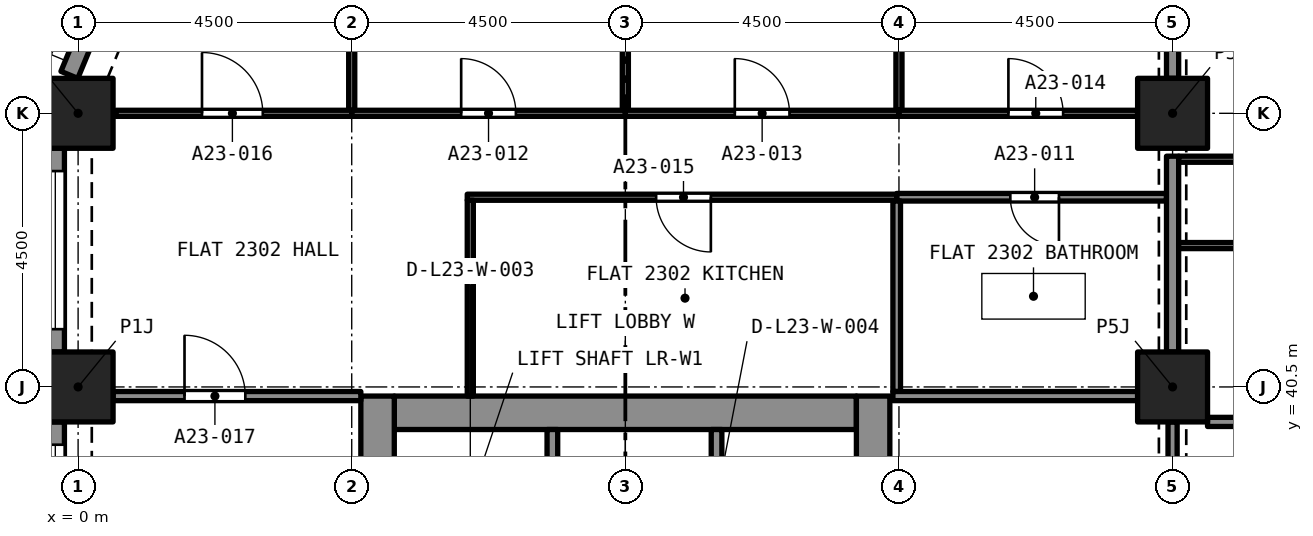
"""IFC4 building model, lengths in metres.
Left out: names, types, materials, properties, quantities, classifications, styles, units other than length and angle.
Written with IfcOpenShell. Run it as: python <this file> out.ifc"""

import sys

from ifc_helpers import new_model, si_unit, direction, frame, frame_2d, origin, origin_2d, place, context, subcontext, project, spatial, rectangle, extrude, element, fill, save


model = new_model("IFC4")
c1 = context("Model", 3, precision=1e-05, world=origin(), true_north=direction((0.0, 1.0)))
c2 = subcontext(c1, "Body", "Model", "MODEL_VIEW")
j1 = project(units=[si_unit("LENGTHUNIT", "METRE"), si_unit("PLANEANGLEUNIT", "RADIAN")], contexts=[c1])
p1 = place(None, origin())
s1 = spatial("IfcSite", under=j1, at=p1, CompositionType="ELEMENT")
p2 = place(p1, origin())
s2 = spatial("IfcBuilding", under=s1, at=p2, CompositionType="ELEMENT")
p3 = place(p2, frame((0.0, 0.0, 86.4)))
s3 = spatial("IfcBuildingStorey", under=s2, at=p3, CompositionType="ELEMENT", Elevation=86.4)
for number, where, z_axis, x_axis in (
    (1, (0.0, 40.5, 0.0), (0.0, 0.0, 1.0), (1.0, 0.0, 0.0)),
    (2, (18.0, 40.5, 0.0), (0.0, 0.0, 1.0), (1.0, 0.0, 0.0)),
    (3, (0.0, 45.0, 0.0), (0.0, 0.0, 1.0), (1.0, 0.0, 0.0)),
    (4, (18.0, 45.0, 0.0), (0.0, 0.0, 1.0), (1.0, 0.0, 0.0)),
):
    element("IfcColumn", number, at=place(p3, frame(where, z_axis=z_axis, x_axis=x_axis)), inside=s3, PredefinedType="COLUMN", context=c2, shape_type="SweptSolid", body=[
        extrude(rectangle(XDim=1.15, YDim=1.15, at=origin_2d()), origin(), (0.0, 0.0, 1.0), 3.2),
    ])
p4 = place(p3, frame((5.2, 40.075, 0.0), z_axis=(0.0, 0.0, 1.0), x_axis=(1.0, 0.0, 0.0)))
e5 = element("IfcWall", 5, at=p4, inside=s3, PredefinedType="SOLIDWALL", context=c2, shape_type="SweptSolid", body=[
    extrude(rectangle(XDim=7.6, YDim=0.55, at=frame_2d((3.8, 0.0))), origin(), (0.0, 0.0, 1.0), 3.2),
])
p5 = place(p3, frame((4.925, 27.15, 0.0), z_axis=(0.0, 0.0, 1.0), x_axis=(0.0, 1.0, 0.0)))
e6 = element("IfcWall", 6, at=p5, inside=s3, PredefinedType="SOLIDWALL", context=c2, shape_type="SweptSolid", body=[
    extrude(rectangle(XDim=13.2, YDim=0.55, at=frame_2d((6.6, 0.0))), origin(), (0.0, 0.0, 1.0), 3.2),
])
p6 = place(p5, frame((8.8, 0.0, 0.0)))
e7 = element("IfcOpeningElement", 7, at=p6, cuts=e6, PredefinedType="OPENING", context=c2, shape_type="SweptSolid", body=[
    extrude(rectangle(XDim=1.2, YDim=2.1, at=frame_2d((0.6, 1.05))), frame((0.0, 0.285, 0.0), z_axis=(0.0, -1.0, 0.0), x_axis=(1.0, 0.0, 0.0)), (0.0, 0.0, 1.0), 0.57),
])
p7 = place(p3, frame((13.075, 27.15, 0.0), z_axis=(0.0, 0.0, 1.0), x_axis=(0.0, 1.0, 0.0)))
e8 = element("IfcWall", 8, at=p7, inside=s3, PredefinedType="SOLIDWALL", context=c2, shape_type="SweptSolid", body=[
    extrude(rectangle(XDim=13.2, YDim=0.55, at=frame_2d((6.6, 0.0))), origin(), (0.0, 0.0, 1.0), 3.2),
])
p8 = place(p7, frame((10.95, 0.0, 0.0)))
e9 = element("IfcOpeningElement", 9, at=p8, cuts=e8, PredefinedType="OPENING", context=c2, shape_type="SweptSolid", body=[
    extrude(rectangle(XDim=1.1, YDim=2.1, at=frame_2d((0.55, 1.05))), frame((0.0, 0.285, 0.0), z_axis=(0.0, -1.0, 0.0), x_axis=(1.0, 0.0, 0.0)), (0.0, 0.0, 1.0), 0.57),
])
p9 = place(p7, frame((8.8, 0.0, 0.0)))
e10 = element("IfcOpeningElement", 10, at=p9, cuts=e8, PredefinedType="OPENING", context=c2, shape_type="SweptSolid", body=[
    extrude(rectangle(XDim=1.2, YDim=2.1, at=frame_2d((0.6, 1.05))), frame((0.0, 0.285, 0.0), z_axis=(0.0, -1.0, 0.0), x_axis=(1.0, 0.0, 0.0)), (0.0, 0.0, 1.0), 0.57),
])
p10 = place(p3, frame((-0.144, 45.632, 0.0), z_axis=(0.0, 0.0, 1.0), x_axis=(0.382723818695, 0.923862802911, 0.0)))
e11 = element("IfcWall", 11, at=p10, inside=s3, PredefinedType="SOLIDWALL", context=c2, shape_type="SweptSolid", body=[
    extrude(rectangle(XDim=2.164, YDim=0.3, at=frame_2d((1.082, 0.0))), origin(), (0.0, 0.0, 1.0), 3.2),
])
p11 = place(p10, frame((0.493, 0.0, 0.45)))
e12 = element("IfcOpeningElement", 12, at=p11, cuts=e11, PredefinedType="OPENING", context=c2, shape_type="SweptSolid", body=[
    extrude(rectangle(XDim=1.4, YDim=1.95, at=frame_2d((0.7, 0.975))), frame((0.0, 0.16, 0.0), z_axis=(0.0, -1.0, 0.0), x_axis=(1.0, 0.0, 0.0)), (0.0, 0.0, 1.0), 0.32),
])
p12 = place(p3, frame((-0.375, 41.075, 0.0), z_axis=(0.0, 0.0, 1.0), x_axis=(0.0, 1.0, 0.0)))
e13 = element("IfcWall", 13, at=p12, inside=s3, PredefinedType="SOLIDWALL", context=c2, shape_type="SweptSolid", body=[
    extrude(rectangle(XDim=3.35, YDim=0.3, at=frame_2d((1.675, 0.0))), origin(), (0.0, 0.0, 1.0), 3.2),
])
p13 = place(p12, frame((0.375, 0.0, 0.45)))
e14 = element("IfcOpeningElement", 14, at=p13, cuts=e13, PredefinedType="OPENING", context=c2, shape_type="SweptSolid", body=[
    extrude(rectangle(XDim=2.6, YDim=1.95, at=frame_2d((1.3, 0.975))), frame((0.0, 0.16, 0.0), z_axis=(0.0, -1.0, 0.0), x_axis=(1.0, 0.0, 0.0)), (0.0, 0.0, 1.0), 0.32),
])
p14 = place(p3, frame((-0.375, 36.575, 0.0), z_axis=(0.0, 0.0, 1.0), x_axis=(0.0, 1.0, 0.0)))
e15 = element("IfcWall", 15, at=p14, inside=s3, PredefinedType="SOLIDWALL", context=c2, shape_type="SweptSolid", body=[
    extrude(rectangle(XDim=3.35, YDim=0.3, at=frame_2d((1.675, 0.0))), origin(), (0.0, 0.0, 1.0), 3.2),
])
p15 = place(p14, frame((0.375, 0.0, 0.45)))
e16 = element("IfcOpeningElement", 16, at=p15, cuts=e15, PredefinedType="OPENING", context=c2, shape_type="SweptSolid", body=[
    extrude(rectangle(XDim=2.6, YDim=1.95, at=frame_2d((1.3, 0.975))), frame((0.0, 0.16, 0.0), z_axis=(0.0, -1.0, 0.0), x_axis=(1.0, 0.0, 0.0)), (0.0, 0.0, 1.0), 0.32),
])
p16 = place(p3, frame((17.9, 43.62, 0.0), z_axis=(0.0, 0.0, 1.0), x_axis=(-1.0, 0.0, 0.0)))
e17 = element("IfcWall", 17, at=p16, inside=s3, PredefinedType="PARTITIONING", context=c2, shape_type="SweptSolid", body=[
    extrude(rectangle(XDim=4.437, YDim=0.125, at=frame_2d((2.219, 0.0))), origin(), (0.0, 0.0, 1.0), 2.9),
])
p17 = place(p16, frame((1.769, 0.0, 0.0)))
e18 = element("IfcOpeningElement", 18, at=p17, cuts=e17, PredefinedType="OPENING", context=c2, shape_type="SweptSolid", body=[
    extrude(rectangle(XDim=0.8, YDim=2.1, at=frame_2d((0.4, 1.05))), frame((0.0, 0.073, 0.0), z_axis=(0.0, -1.0, 0.0), x_axis=(1.0, 0.0, 0.0)), (0.0, 0.0, 1.0), 0.145),
])
p18 = place(p3, frame((13.463, 40.425, 0.0), z_axis=(0.0, 0.0, 1.0), x_axis=(0.0, 1.0, 0.0)))
e19 = element("IfcWall", 19, at=p18, inside=s3, PredefinedType="PARTITIONING", context=c2, shape_type="SweptSolid", body=[
    extrude(rectangle(XDim=3.133, YDim=0.125, at=frame_2d((1.566, 0.0))), origin(), (0.0, 0.0, 1.0), 2.9),
])
p19 = place(p3, frame((18.0, 41.075, 0.0), z_axis=(0.0, 0.0, 1.0), x_axis=(0.0, 1.0, 0.0)))
e20 = element("IfcWall", 20, at=p19, inside=s3, PredefinedType="PARTITIONING", context=c2, shape_type="SweptSolid", body=[
    extrude(rectangle(XDim=3.22, YDim=0.2, at=frame_2d((1.61, 0.0))), origin(), (0.0, 0.0, 1.0), 2.38),
])
p20 = place(p3, frame((13.4, 40.35, 0.0), z_axis=(0.0, 0.0, 1.0), x_axis=(1.0, 0.0, 0.0)))
e21 = element("IfcWall", 21, at=p20, inside=s3, PredefinedType="PARTITIONING", context=c2, shape_type="SweptSolid", body=[
    extrude(rectangle(XDim=4.025, YDim=0.15, at=frame_2d((2.012, 0.0))), origin(), (0.0, 0.0, 1.0), 2.9),
])
p21 = place(p3, frame((9.0, 45.05, 0.0), z_axis=(0.0, 0.0, 1.0), x_axis=(0.0, 1.0, 0.0)))
e22 = element("IfcWall", 22, at=p21, inside=s3, PredefinedType="PARTITIONING", context=c2, shape_type="SweptSolid", body=[
    extrude(rectangle(XDim=3.875, YDim=0.1, at=frame_2d((1.938, 0.0))), origin(), (0.0, 0.0, 1.0), 2.9),
])
p22 = place(p3, frame((4.5, 45.0, 0.0), z_axis=(0.0, 0.0, 1.0), x_axis=(1.0, 0.0, 0.0)))
e23 = element("IfcWall", 23, at=p22, inside=s3, PredefinedType="PARTITIONING", context=c2, shape_type="SweptSolid", body=[
    extrude(rectangle(XDim=4.5, YDim=0.1, at=frame_2d((2.25, 0.0))), origin(), (0.0, 0.0, 1.0), 2.9),
])
p23 = place(p22, frame((1.8, 0.0, 0.0)))
e24 = element("IfcOpeningElement", 24, at=p23, cuts=e23, PredefinedType="OPENING", context=c2, shape_type="SweptSolid", body=[
    extrude(rectangle(XDim=0.9, YDim=2.1, at=frame_2d((0.45, 1.05))), frame((0.0, 0.06, 0.0), z_axis=(0.0, -1.0, 0.0), x_axis=(1.0, 0.0, 0.0)), (0.0, 0.0, 1.0), 0.12),
])
p24 = place(p3, frame((4.5, 45.05, 0.0), z_axis=(0.0, 0.0, 1.0), x_axis=(0.0, 1.0, 0.0)))
e25 = element("IfcWall", 25, at=p24, inside=s3, PredefinedType="PARTITIONING", context=c2, shape_type="SweptSolid", body=[
    extrude(rectangle(XDim=3.828, YDim=0.1, at=frame_2d((1.914, 0.0))), origin(), (0.0, 0.0, 1.0), 2.9),
])
p25 = place(p3, frame((13.5, 45.05, 0.0), z_axis=(0.0, 0.0, 1.0), x_axis=(0.0, 1.0, 0.0)))
e26 = element("IfcWall", 26, at=p25, inside=s3, PredefinedType="PARTITIONING", context=c2, shape_type="SweptSolid", body=[
    extrude(rectangle(XDim=3.875, YDim=0.1, at=frame_2d((1.938, 0.0))), origin(), (0.0, 0.0, 1.0), 2.9),
])
p26 = place(p3, frame((9.0, 45.0, 0.0), z_axis=(0.0, 0.0, 1.0), x_axis=(1.0, 0.0, 0.0)))
e27 = element("IfcWall", 27, at=p26, inside=s3, PredefinedType="PARTITIONING", context=c2, shape_type="SweptSolid", body=[
    extrude(rectangle(XDim=4.5, YDim=0.1, at=frame_2d((2.25, 0.0))), origin(), (0.0, 0.0, 1.0), 2.9),
])
p27 = place(p26, frame((1.8, 0.0, 0.0)))
e28 = element("IfcOpeningElement", 28, at=p27, cuts=e27, PredefinedType="OPENING", context=c2, shape_type="SweptSolid", body=[
    extrude(rectangle(XDim=0.9, YDim=2.1, at=frame_2d((0.45, 1.05))), frame((0.0, 0.06, 0.0), z_axis=(0.0, -1.0, 0.0), x_axis=(1.0, 0.0, 0.0)), (0.0, 0.0, 1.0), 0.12),
])
p28 = place(p3, frame((13.5, 45.0, 0.0), z_axis=(0.0, 0.0, 1.0), x_axis=(1.0, 0.0, 0.0)))
e29 = element("IfcWall", 29, at=p28, inside=s3, PredefinedType="PARTITIONING", context=c2, shape_type="SweptSolid", body=[
    extrude(rectangle(XDim=3.925, YDim=0.1, at=frame_2d((1.962, 0.0))), origin(), (0.0, 0.0, 1.0), 2.9),
])
p29 = place(p28, frame((1.8, 0.0, 0.0)))
e30 = element("IfcOpeningElement", 30, at=p29, cuts=e29, PredefinedType="OPENING", context=c2, shape_type="SweptSolid", body=[
    extrude(rectangle(XDim=0.9, YDim=2.1, at=frame_2d((0.45, 1.05))), frame((0.0, 0.06, 0.0), z_axis=(0.0, -1.0, 0.0), x_axis=(1.0, 0.0, 0.0)), (0.0, 0.0, 1.0), 0.12),
])
p30 = place(p3, frame((18.0, 45.575, 0.0), z_axis=(0.0, 0.0, 1.0), x_axis=(0.0, 1.0, 0.0)))
e31 = element("IfcWall", 31, at=p30, inside=s3, PredefinedType="PARTITIONING", context=c2, shape_type="SweptSolid", body=[
    extrude(rectangle(XDim=3.35, YDim=0.2, at=frame_2d((1.675, 0.0))), origin(), (0.0, 0.0, 1.0), 2.38),
])
p31 = place(p3, frame((13.463, 43.62, 0.0), z_axis=(0.0, 0.0, 1.0), x_axis=(-1.0, 0.0, 0.0)))
e32 = element("IfcWall", 32, at=p31, inside=s3, PredefinedType="PARTITIONING", context=c2, shape_type="SweptSolid", body=[
    extrude(rectangle(XDim=7.063, YDim=0.1, at=frame_2d((3.531, 0.0))), origin(), (0.0, 0.0, 1.0), 2.9),
])
p32 = place(p31, frame((3.056, 0.0, 0.0)))
e33 = element("IfcOpeningElement", 33, at=p32, cuts=e32, PredefinedType="OPENING", context=c2, shape_type="SweptSolid", body=[
    extrude(rectangle(XDim=0.9, YDim=2.1, at=frame_2d((0.45, 1.05))), frame((0.0, 0.06, 0.0), z_axis=(0.0, -1.0, 0.0), x_axis=(1.0, 0.0, 0.0)), (0.0, 0.0, 1.0), 0.12),
])
p33 = place(p3, frame((6.45, 40.35, 0.0), z_axis=(0.0, 0.0, 1.0), x_axis=(0.0, 1.0, 0.0)))
e34 = element("IfcWall", 34, at=p33, inside=s3, PredefinedType="PARTITIONING", context=c2, shape_type="SweptSolid", body=[
    extrude(rectangle(XDim=3.22, YDim=0.1, at=frame_2d((1.61, 0.0))), origin(), (0.0, 0.0, 1.0), 2.9),
])
p34 = place(p3, frame((0.622, 45.0, 0.0), z_axis=(0.0, 0.0, 1.0), x_axis=(1.0, 0.0, 0.0)))
e35 = element("IfcWall", 35, at=p34, inside=s3, PredefinedType="PARTITIONING", context=c2, shape_type="SweptSolid", body=[
    extrude(rectangle(XDim=3.878, YDim=0.1, at=frame_2d((1.939, 0.0))), origin(), (0.0, 0.0, 1.0), 2.9),
])
p35 = place(p34, frame((1.415, 0.0, 0.0)))
e36 = element("IfcOpeningElement", 36, at=p35, cuts=e35, PredefinedType="OPENING", context=c2, shape_type="SweptSolid", body=[
    extrude(rectangle(XDim=1.0, YDim=2.1, at=frame_2d((0.5, 1.05))), frame((0.0, 0.06, 0.0), z_axis=(0.0, -1.0, 0.0), x_axis=(1.0, 0.0, 0.0)), (0.0, 0.0, 1.0), 0.12),
])
p36 = place(p3, frame((0.575, 40.35, 0.0), z_axis=(0.0, 0.0, 1.0), x_axis=(1.0, 0.0, 0.0)))
e37 = element("IfcWall", 37, at=p36, inside=s3, PredefinedType="PARTITIONING", context=c2, shape_type="SweptSolid", body=[
    extrude(rectangle(XDim=4.075, YDim=0.15, at=frame_2d((2.038, 0.0))), origin(), (0.0, 0.0, 1.0), 2.9),
])
p37 = place(p36, frame((1.175, 0.0, 0.0)))
e38 = element("IfcOpeningElement", 38, at=p37, cuts=e37, PredefinedType="OPENING", context=c2, shape_type="SweptSolid", body=[
    extrude(rectangle(XDim=1.0, YDim=2.1, at=frame_2d((0.5, 1.05))), frame((0.0, 0.085, 0.0), z_axis=(0.0, -1.0, 0.0), x_axis=(1.0, 0.0, 0.0)), (0.0, 0.0, 1.0), 0.17),
])
p38 = place(p3, frame((24.2, 42.825, 0.0), z_axis=(0.0, 0.0, 1.0), x_axis=(-1.0, 0.0, 0.0)))
e39 = element("IfcWall", 39, at=p38, inside=s3, PredefinedType="PARTITIONING", context=c2, shape_type="SweptSolid", body=[
    extrude(rectangle(XDim=6.1, YDim=0.1, at=frame_2d((3.05, 0.0))), origin(), (0.0, 0.0, 1.0), 2.75),
])
p39 = place(p38, frame((2.675, 0.0, 0.0)))
e40 = element("IfcOpeningElement", 40, at=p39, cuts=e39, PredefinedType="OPENING", context=c2, shape_type="SweptSolid", body=[
    extrude(rectangle(XDim=0.9, YDim=2.1, at=frame_2d((0.45, 1.05))), frame((0.0, 0.06, 0.0), z_axis=(0.0, -1.0, 0.0), x_axis=(1.0, 0.0, 0.0)), (0.0, 0.0, 1.0), 0.12),
])
p40 = place(p3, frame((18.1, 44.245, 0.0), z_axis=(0.0, 0.0, 1.0), x_axis=(1.0, 0.0, 0.0)))
e41 = element("IfcWall", 41, at=p40, inside=s3, PredefinedType="PARTITIONING", context=c2, shape_type="SweptSolid", body=[
    extrude(rectangle(XDim=4.4, YDim=0.1, at=frame_2d((2.2, 0.0))), origin(), (0.0, 0.0, 1.0), 2.75),
])
p41 = place(p40, frame((1.65, 0.0, 0.0)))
e42 = element("IfcOpeningElement", 42, at=p41, cuts=e41, PredefinedType="OPENING", context=c2, shape_type="SweptSolid", body=[
    extrude(rectangle(XDim=1.0, YDim=2.1, at=frame_2d((0.5, 1.05))), frame((0.0, 0.06, 0.0), z_axis=(0.0, -1.0, 0.0), x_axis=(1.0, 0.0, 0.0)), (0.0, 0.0, 1.0), 0.12),
])
p42 = place(p3, frame((18.575, 39.925, 0.0), z_axis=(0.0, 0.0, 1.0), x_axis=(1.0, 0.0, 0.0)))
e43 = element("IfcWall", 43, at=p42, inside=s3, PredefinedType="PARTITIONING", context=c2, shape_type="SweptSolid", body=[
    extrude(rectangle(XDim=5.575, YDim=0.15, at=frame_2d((2.788, 0.0))), origin(), (0.0, 0.0, 1.0), 2.75),
])
p43 = place(p3, frame((18.0, 39.925, 0.0), z_axis=(0.0, 0.0, 1.0), x_axis=(0.0, -1.0, 0.0)))
e44 = element("IfcWall", 44, at=p43, inside=s3, PredefinedType="PARTITIONING", context=c2, shape_type="SweptSolid", body=[
    extrude(rectangle(XDim=3.35, YDim=0.15, at=frame_2d((1.675, 0.0))), origin(), (0.0, 0.0, 1.0), 2.38),
])
p44 = place(p43, frame((1.075, 0.0, 0.0)))
e45 = element("IfcOpeningElement", 45, at=p44, cuts=e44, PredefinedType="OPENING", context=c2, shape_type="SweptSolid", body=[
    extrude(rectangle(XDim=1.2, YDim=2.1, at=frame_2d((0.6, 1.05))), frame((0.0, 0.085, 0.0), z_axis=(0.0, -1.0, 0.0), x_axis=(1.0, 0.0, 0.0)), (0.0, 0.0, 1.0), 0.17),
])
p45 = place(p3, frame((7.8, 37.5, 0.0), z_axis=(0.0, 0.0, 1.0), x_axis=(0.0, 1.0, 0.0)))
e46 = element("IfcWall", 46, at=p45, inside=s3, PredefinedType="SOLIDWALL", context=c2, shape_type="SweptSolid", body=[
    extrude(rectangle(XDim=2.3, YDim=0.175, at=frame_2d((1.15, 0.0))), origin(), (0.0, 0.0, 1.0), 2.9),
])
p46 = place(p3, frame((10.5, 37.5, 0.0), z_axis=(0.0, 0.0, 1.0), x_axis=(0.0, 1.0, 0.0)))
e47 = element("IfcWall", 47, at=p46, inside=s3, PredefinedType="SOLIDWALL", context=c2, shape_type="SweptSolid", body=[
    extrude(rectangle(XDim=2.3, YDim=0.175, at=frame_2d((1.15, 0.0))), origin(), (0.0, 0.0, 1.0), 2.9),
])
p47 = place(p46, frame((0.65, 0.0, 0.0)))
e48 = element("IfcOpeningElement", 48, at=p47, cuts=e47, PredefinedType="OPENING", context=c2, shape_type="SweptSolid", body=[
    extrude(rectangle(XDim=1.0, YDim=2.1, at=frame_2d((0.5, 1.05))), frame((0.0, 0.097, 0.0), z_axis=(0.0, -1.0, 0.0), x_axis=(1.0, 0.0, 0.0)), (0.0, 0.0, 1.0), 0.195),
])
p48 = place(p13, origin())
e49 = element("IfcWindow", 49, at=p48, inside=s3, PartitioningType="SINGLE_PANEL", PredefinedType="WINDOW", context=c2, shape_type="SweptSolid", body=[
    extrude(rectangle(XDim=2.6, YDim=1.95, at=frame_2d((1.3, 0.975))), frame((0.0, 0.03, 0.0), z_axis=(0.0, -1.0, 0.0), x_axis=(1.0, 0.0, 0.0)), (0.0, 0.0, 1.0), 0.06),
])
fill(e14, e49)
p49 = place(p15, origin())
e50 = element("IfcWindow", 50, at=p49, inside=s3, PartitioningType="SINGLE_PANEL", PredefinedType="WINDOW", context=c2, shape_type="SweptSolid", body=[
    extrude(rectangle(XDim=2.6, YDim=1.95, at=frame_2d((1.3, 0.975))), frame((0.0, 0.03, 0.0), z_axis=(0.0, -1.0, 0.0), x_axis=(1.0, 0.0, 0.0)), (0.0, 0.0, 1.0), 0.06),
])
fill(e16, e50)
p50 = place(p17, origin())
e51 = element("IfcDoor", 51, at=p50, inside=s3, OperationType="SINGLE_SWING_LEFT", PredefinedType="DOOR", context=c2, shape_type="SweptSolid", body=[
    extrude(rectangle(XDim=0.8, YDim=2.1, at=frame_2d((0.4, 1.05))), frame((0.0, 0.025, 0.0), z_axis=(0.0, -1.0, 0.0), x_axis=(1.0, 0.0, 0.0)), (0.0, 0.0, 1.0), 0.05),
])
fill(e18, e51)
p51 = place(p23, origin())
e52 = element("IfcDoor", 52, at=p51, inside=s3, OperationType="SINGLE_SWING_RIGHT", PredefinedType="DOOR", context=c2, shape_type="SweptSolid", body=[
    extrude(rectangle(XDim=0.9, YDim=2.1, at=frame_2d((0.45, 1.05))), frame((0.0, 0.025, 0.0), z_axis=(0.0, -1.0, 0.0), x_axis=(1.0, 0.0, 0.0)), (0.0, 0.0, 1.0), 0.05),
])
fill(e24, e52)
p52 = place(p27, origin())
e53 = element("IfcDoor", 53, at=p52, inside=s3, OperationType="SINGLE_SWING_LEFT", PredefinedType="DOOR", context=c2, shape_type="SweptSolid", body=[
    extrude(rectangle(XDim=0.9, YDim=2.1, at=frame_2d((0.45, 1.05))), frame((0.0, 0.025, 0.0), z_axis=(0.0, -1.0, 0.0), x_axis=(1.0, 0.0, 0.0)), (0.0, 0.0, 1.0), 0.05),
])
fill(e28, e53)
p53 = place(p29, origin())
e54 = element("IfcDoor", 54, at=p53, inside=s3, OperationType="SINGLE_SWING_RIGHT", PredefinedType="DOOR", context=c2, shape_type="SweptSolid", body=[
    extrude(rectangle(XDim=0.9, YDim=2.1, at=frame_2d((0.45, 1.05))), frame((0.0, 0.025, 0.0), z_axis=(0.0, -1.0, 0.0), x_axis=(1.0, 0.0, 0.0)), (0.0, 0.0, 1.0), 0.05),
])
fill(e30, e54)
p54 = place(p32, origin())
e55 = element("IfcDoor", 55, at=p54, inside=s3, OperationType="SINGLE_SWING_LEFT", PredefinedType="DOOR", context=c2, shape_type="SweptSolid", body=[
    extrude(rectangle(XDim=0.9, YDim=2.1, at=frame_2d((0.45, 1.05))), frame((0.0, 0.025, 0.0), z_axis=(0.0, -1.0, 0.0), x_axis=(1.0, 0.0, 0.0)), (0.0, 0.0, 1.0), 0.05),
])
fill(e33, e55)
p55 = place(p35, origin())
e56 = element("IfcDoor", 56, at=p55, inside=s3, OperationType="SINGLE_SWING_LEFT", PredefinedType="DOOR", context=c2, shape_type="SweptSolid", body=[
    extrude(rectangle(XDim=1.0, YDim=2.1, at=frame_2d((0.5, 1.05))), frame((0.0, 0.025, 0.0), z_axis=(0.0, -1.0, 0.0), x_axis=(1.0, 0.0, 0.0)), (0.0, 0.0, 1.0), 0.05),
])
fill(e36, e56)
p56 = place(p37, origin())
e57 = element("IfcDoor", 57, at=p56, inside=s3, OperationType="SINGLE_SWING_LEFT", PredefinedType="DOOR", context=c2, shape_type="SweptSolid", body=[
    extrude(rectangle(XDim=1.0, YDim=2.1, at=frame_2d((0.5, 1.05))), frame((0.0, 0.025, 0.0), z_axis=(0.0, -1.0, 0.0), x_axis=(1.0, 0.0, 0.0)), (0.0, 0.0, 1.0), 0.05),
])
fill(e38, e57)
save(model, sys.argv[1])
